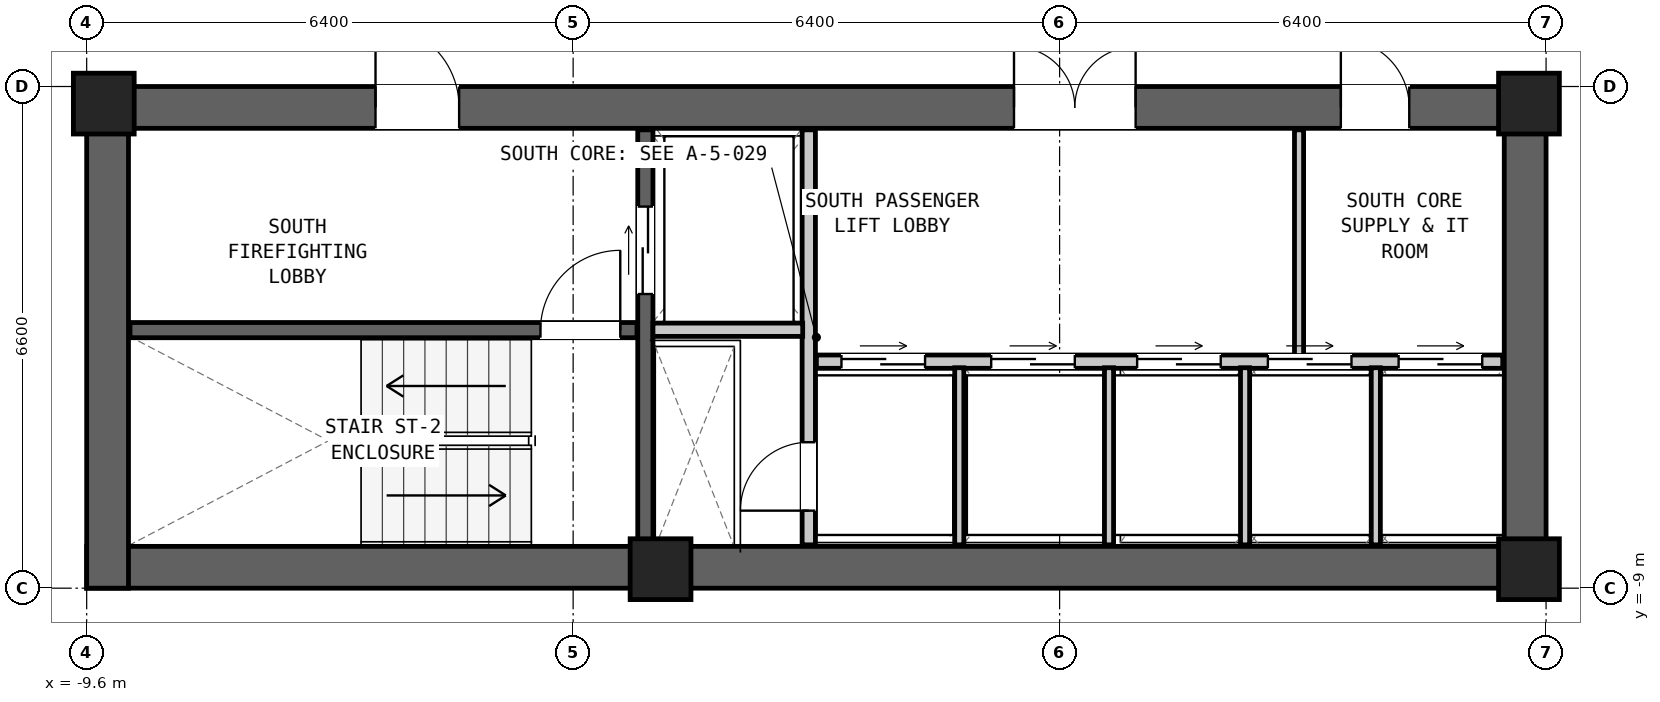
"""IFC4 building model, lengths in metres.
Left out: names, types, materials, properties, quantities, classifications, styles, units other than length and angle.
Written with IfcOpenShell. Run it as: python <this file> out.ifc"""

import sys

from ifc_helpers import new_model, si_unit, direction, frame, frame_2d, origin, origin_2d, place, context, subcontext, project, spatial, rectangle, extrude, element, fill, save


model = new_model("IFC4")
c1 = context("Model", 3, precision=1e-05, world=origin(), true_north=direction((0.0, 1.0)))
c2 = subcontext(c1, "Body", "Model", "MODEL_VIEW")
j1 = project(units=[si_unit("LENGTHUNIT", "METRE"), si_unit("PLANEANGLEUNIT", "RADIAN")], contexts=[c1])
p1 = place(None, origin())
s1 = spatial("IfcSite", under=j1, at=p1, CompositionType="ELEMENT")
p2 = place(p1, origin())
s2 = spatial("IfcBuilding", under=s1, at=p2, CompositionType="ELEMENT")
p3 = place(p2, frame((0.0, 0.0, 90.8)))
s3 = spatial("IfcBuildingStorey", under=s2, at=p3, CompositionType="ELEMENT", Elevation=90.8)
p4 = place(p3, frame((-9.6, -8.725, 0.0), z_axis=(0.0, 0.0, 1.0), x_axis=(1.0, 0.0, 0.0)))
e1 = element("IfcWall", 1, at=p4, inside=s3, PredefinedType="SHEAR", context=c2, shape_type="SweptSolid", body=[
    extrude(rectangle(XDim=19.2, YDim=0.55, at=frame_2d((9.6, 0.0))), origin(), (0.0, 0.0, 1.0), 3.05),
])
p5 = place(p3, frame((-9.6, -2.675, 0.0), z_axis=(0.0, 0.0, 1.0), x_axis=(1.0, 0.0, 0.0)))
e2 = element("IfcWall", 2, at=p5, inside=s3, PredefinedType="SHEAR", context=c2, shape_type="SweptSolid", body=[
    extrude(rectangle(XDim=19.2, YDim=0.55, at=frame_2d((9.6, 0.0))), origin(), (0.0, 0.0, 1.0), 3.05),
])
p6 = place(p5, frame((3.8, 0.0, 0.0)))
e3 = element("IfcOpeningElement", 3, at=p6, cuts=e2, PredefinedType="OPENING", context=c2, shape_type="SweptSolid", body=[
    extrude(rectangle(XDim=1.1, YDim=2.08, at=frame_2d((0.55, 1.04))), frame((0.0, 0.287, 0.0), z_axis=(0.0, -1.0, 0.0), x_axis=(1.0, 0.0, 0.0)), (0.0, 0.0, 1.0), 0.574),
])
p7 = place(p5, frame((12.2, 0.0, 0.0)))
e4 = element("IfcOpeningElement", 4, at=p7, cuts=e2, PredefinedType="OPENING", context=c2, shape_type="SweptSolid", body=[
    extrude(rectangle(XDim=1.6, YDim=2.12, at=frame_2d((0.8, 1.06))), frame((0.0, 0.287, 0.0), z_axis=(0.0, -1.0, 0.0), x_axis=(1.0, 0.0, 0.0)), (0.0, 0.0, 1.0), 0.574),
])
p8 = place(p5, frame((16.5, 0.0, 0.0)))
e5 = element("IfcOpeningElement", 5, at=p8, cuts=e2, PredefinedType="OPENING", context=c2, shape_type="SweptSolid", body=[
    extrude(rectangle(XDim=0.9, YDim=2.05, at=frame_2d((0.45, 1.025))), frame((0.0, 0.287, 0.0), z_axis=(0.0, -1.0, 0.0), x_axis=(1.0, 0.0, 0.0)), (0.0, 0.0, 1.0), 0.574),
])
for number, where, z_axis, x_axis in (
    (6, (-9.325, -9.0, 0.0), (0.0, 0.0, 1.0), (0.0, 1.0, 0.0)),
    (7, (9.325, -9.0, 0.0), (0.0, 0.0, 1.0), (0.0, 1.0, 0.0)),
):
    element("IfcWall", number, at=place(p3, frame(where, z_axis=z_axis, x_axis=x_axis)), inside=s3, PredefinedType="SHEAR", context=c2, shape_type="SweptSolid", body=[
        extrude(rectangle(XDim=6.6, YDim=0.55, at=frame_2d((3.3, 0.0))), origin(), (0.0, 0.0, 1.0), 3.05),
    ])
for number, where, z_axis, x_axis in (
    (8, (-9.375, -2.625, 0.0), (0.0, 0.0, 1.0), (1.0, 0.0, 0.0)),
    (9, (9.375, -2.625, 0.0), (0.0, 0.0, 1.0), (1.0, 0.0, 0.0)),
    (10, (-2.05, -8.75, 0.0), (0.0, 0.0, 1.0), (1.0, 0.0, 0.0)),
    (11, (9.375, -8.75, 0.0), (0.0, 0.0, 1.0), (1.0, 0.0, 0.0)),
):
    element("IfcColumn", number, at=place(p3, frame(where, z_axis=z_axis, x_axis=x_axis)), inside=s3, PredefinedType="COLUMN", context=c2, shape_type="SweptSolid", body=[
        extrude(rectangle(XDim=0.8, YDim=0.8, at=origin_2d()), origin(), (0.0, 0.0, 1.0), 3.05),
    ])
p9 = place(p3, frame((-9.03, -5.605, 0.0), z_axis=(0.0, 0.0, 1.0), x_axis=(1.0, 0.0, 0.0)))
e12 = element("IfcWall", 12, at=p9, inside=s3, PredefinedType="SHEAR", context=c2, shape_type="SweptSolid", body=[
    extrude(rectangle(XDim=6.67, YDim=0.2, at=frame_2d((3.335, 0.0))), origin(), (0.0, 0.0, 1.0), 2.83),
])
p10 = place(p9, frame((5.4, 0.0, 0.0)))
e13 = element("IfcOpeningElement", 13, at=p10, cuts=e12, PredefinedType="OPENING", context=c2, shape_type="SweptSolid", body=[
    extrude(rectangle(XDim=1.05, YDim=2.08, at=frame_2d((0.525, 1.04))), frame((0.0, 0.112, 0.0), z_axis=(0.0, -1.0, 0.0), x_axis=(1.0, 0.0, 0.0)), (0.0, 0.0, 1.0), 0.224),
])
p11 = place(p3, frame((-2.25, -8.43, 0.0), z_axis=(0.0, 0.0, 1.0), x_axis=(0.0, 1.0, 0.0)))
e14 = element("IfcWall", 14, at=p11, inside=s3, PredefinedType="SHEAR", context=c2, shape_type="SweptSolid", body=[
    extrude(rectangle(XDim=5.46, YDim=0.2, at=frame_2d((2.73, 0.0))), origin(), (0.0, 0.0, 1.0), 2.83),
])
p12 = place(p11, frame((3.3, 0.0, 0.0)))
e15 = element("IfcOpeningElement", 15, at=p12, cuts=e14, PredefinedType="OPENING", context=c2, shape_type="SweptSolid", body=[
    extrude(rectangle(XDim=1.15, YDim=2.08, at=frame_2d((0.575, 1.04))), frame((0.0, 0.112, 0.0), z_axis=(0.0, -1.0, 0.0), x_axis=(1.0, 0.0, 0.0)), (0.0, 0.0, 1.0), 0.224),
])
p13 = place(p3, frame((-0.1, -8.43, 0.0), z_axis=(0.0, 0.0, 1.0), x_axis=(0.0, 1.0, 0.0)))
e16 = element("IfcWall", 16, at=p13, inside=s3, PredefinedType="PARTITIONING", context=c2, shape_type="SweptSolid", body=[
    extrude(rectangle(XDim=5.46, YDim=0.175, at=frame_2d((2.73, 0.0))), origin(), (0.0, 0.0, 1.0), 2.83),
])
p14 = place(p13, frame((0.45, 0.0, 0.0)))
e17 = element("IfcOpeningElement", 17, at=p14, cuts=e16, PredefinedType="OPENING", context=c2, shape_type="SweptSolid", body=[
    extrude(rectangle(XDim=0.9, YDim=2.05, at=frame_2d((0.45, 1.025))), frame((0.0, 0.1, 0.0), z_axis=(0.0, -1.0, 0.0), x_axis=(1.0, 0.0, 0.0)), (0.0, 0.0, 1.0), 0.199),
])
p15 = place(p3, frame((-2.15, -5.6, 0.0), z_axis=(0.0, 0.0, 1.0), x_axis=(1.0, 0.0, 0.0)))
e18 = element("IfcWall", 18, at=p15, inside=s3, PredefinedType="PARTITIONING", context=c2, shape_type="SweptSolid", body=[
    extrude(rectangle(XDim=1.97, YDim=0.175, at=frame_2d((0.985, 0.0))), origin(), (0.0, 0.0, 1.0), 2.83),
])
p16 = place(p3, frame((0.0, -6.02, 0.0), z_axis=(0.0, 0.0, 1.0), x_axis=(1.0, 0.0, 0.0)))
e19 = element("IfcWall", 19, at=p16, inside=s3, PredefinedType="PARTITIONING", context=c2, shape_type="SweptSolid", body=[
    extrude(rectangle(XDim=9.03, YDim=0.175, at=frame_2d((4.515, 0.0))), origin(), (0.0, 0.0, 1.0), 2.83),
])
p17 = place(p16, frame((0.33, 0.0, 0.0)))
e20 = element("IfcOpeningElement", 20, at=p17, cuts=e19, PredefinedType="OPENING", context=c2, shape_type="SweptSolid", body=[
    extrude(rectangle(XDim=1.1, YDim=2.06, at=frame_2d((0.55, 1.03))), frame((0.0, 0.1, 0.0), z_axis=(0.0, -1.0, 0.0), x_axis=(1.0, 0.0, 0.0)), (0.0, 0.0, 1.0), 0.199),
])
p18 = place(p16, frame((2.3, 0.0, 0.0)))
e21 = element("IfcOpeningElement", 21, at=p18, cuts=e19, PredefinedType="OPENING", context=c2, shape_type="SweptSolid", body=[
    extrude(rectangle(XDim=1.1, YDim=2.06, at=frame_2d((0.55, 1.03))), frame((0.0, 0.1, 0.0), z_axis=(0.0, -1.0, 0.0), x_axis=(1.0, 0.0, 0.0)), (0.0, 0.0, 1.0), 0.199),
])
p19 = place(p16, frame((4.22, 0.0, 0.0)))
e22 = element("IfcOpeningElement", 22, at=p19, cuts=e19, PredefinedType="OPENING", context=c2, shape_type="SweptSolid", body=[
    extrude(rectangle(XDim=1.1, YDim=2.06, at=frame_2d((0.55, 1.03))), frame((0.0, 0.1, 0.0), z_axis=(0.0, -1.0, 0.0), x_axis=(1.0, 0.0, 0.0)), (0.0, 0.0, 1.0), 0.199),
])
p20 = place(p16, frame((5.94, 0.0, 0.0)))
e23 = element("IfcOpeningElement", 23, at=p20, cuts=e19, PredefinedType="OPENING", context=c2, shape_type="SweptSolid", body=[
    extrude(rectangle(XDim=1.1, YDim=2.06, at=frame_2d((0.55, 1.03))), frame((0.0, 0.1, 0.0), z_axis=(0.0, -1.0, 0.0), x_axis=(1.0, 0.0, 0.0)), (0.0, 0.0, 1.0), 0.199),
])
p21 = place(p16, frame((7.66, 0.0, 0.0)))
e24 = element("IfcOpeningElement", 24, at=p21, cuts=e19, PredefinedType="OPENING", context=c2, shape_type="SweptSolid", body=[
    extrude(rectangle(XDim=1.1, YDim=2.06, at=frame_2d((0.55, 1.03))), frame((0.0, 0.1, 0.0), z_axis=(0.0, -1.0, 0.0), x_axis=(1.0, 0.0, 0.0)), (0.0, 0.0, 1.0), 0.199),
])
for number, where, z_axis, x_axis in (
    (25, (1.88, -8.43, 0.0), (0.0, 0.0, 1.0), (0.0, 1.0, 0.0)),
    (26, (3.85, -8.43, 0.0), (0.0, 0.0, 1.0), (0.0, 1.0, 0.0)),
    (27, (5.64, -8.43, 0.0), (0.0, 0.0, 1.0), (0.0, 1.0, 0.0)),
    (28, (7.36, -8.43, 0.0), (0.0, 0.0, 1.0), (0.0, 1.0, 0.0)),
):
    element("IfcWall", number, at=place(p3, frame(where, z_axis=z_axis, x_axis=x_axis)), inside=s3, PredefinedType="PARTITIONING", context=c2, shape_type="SweptSolid", body=[
        extrude(rectangle(XDim=2.33, YDim=0.12, at=frame_2d((1.165, 0.0))), origin(), (0.0, 0.0, 1.0), 2.83),
    ])
p22 = place(p3, frame((6.35, -5.94, 0.0), z_axis=(0.0, 0.0, 1.0), x_axis=(0.0, 1.0, 0.0)))
e29 = element("IfcWall", 29, at=p22, inside=s3, PredefinedType="PARTITIONING", context=c2, shape_type="SweptSolid", body=[
    extrude(rectangle(XDim=2.97, YDim=0.12, at=frame_2d((1.485, 0.0))), origin(), (0.0, 0.0, 1.0), 2.83),
])
p23 = place(p10, origin())
e30 = element("IfcDoor", 30, at=p23, inside=s3, OperationType="SINGLE_SWING_RIGHT", PredefinedType="DOOR", context=c2, shape_type="SweptSolid", body=[
    extrude(rectangle(XDim=1.05, YDim=2.08, at=frame_2d((0.525, 1.04))), frame((0.0, 0.025, 0.0), z_axis=(0.0, -1.0, 0.0), x_axis=(1.0, 0.0, 0.0)), (0.0, 0.0, 1.0), 0.05),
])
fill(e13, e30)
p24 = place(p6, origin())
e31 = element("IfcDoor", 31, at=p24, inside=s3, OperationType="SINGLE_SWING_LEFT", PredefinedType="DOOR", context=c2, shape_type="SweptSolid", body=[
    extrude(rectangle(XDim=1.1, YDim=2.08, at=frame_2d((0.55, 1.04))), frame((0.0, 0.025, 0.0), z_axis=(0.0, -1.0, 0.0), x_axis=(1.0, 0.0, 0.0)), (0.0, 0.0, 1.0), 0.05),
])
fill(e3, e31)
p25 = place(p12, origin())
e32 = element("IfcDoor", 32, at=p25, inside=s3, OperationType="DOUBLE_DOOR_SLIDING", PredefinedType="DOOR", context=c2, shape_type="SweptSolid", body=[
    extrude(rectangle(XDim=1.15, YDim=2.08, at=frame_2d((0.575, 1.04))), frame((0.0, 0.025, 0.0), z_axis=(0.0, -1.0, 0.0), x_axis=(1.0, 0.0, 0.0)), (0.0, 0.0, 1.0), 0.05),
])
fill(e15, e32)
p26 = place(p14, origin())
e33 = element("IfcDoor", 33, at=p26, inside=s3, OperationType="SINGLE_SWING_LEFT", PredefinedType="DOOR", context=c2, shape_type="SweptSolid", body=[
    extrude(rectangle(XDim=0.9, YDim=2.05, at=frame_2d((0.45, 1.025))), frame((0.0, 0.025, 0.0), z_axis=(0.0, -1.0, 0.0), x_axis=(1.0, 0.0, 0.0)), (0.0, 0.0, 1.0), 0.05),
])
fill(e17, e33)
p27 = place(p7, origin())
e34 = element("IfcDoor", 34, at=p27, inside=s3, OperationType="DOUBLE_DOOR_SINGLE_SWING", PredefinedType="DOOR", context=c2, shape_type="SweptSolid", body=[
    extrude(rectangle(XDim=1.6, YDim=2.12, at=frame_2d((0.8, 1.06))), frame((0.0, 0.025, 0.0), z_axis=(0.0, -1.0, 0.0), x_axis=(1.0, 0.0, 0.0)), (0.0, 0.0, 1.0), 0.05),
])
fill(e4, e34)
p28 = place(p8, origin())
e35 = element("IfcDoor", 35, at=p28, inside=s3, OperationType="SINGLE_SWING_LEFT", PredefinedType="DOOR", context=c2, shape_type="SweptSolid", body=[
    extrude(rectangle(XDim=0.9, YDim=2.05, at=frame_2d((0.45, 1.025))), frame((0.0, 0.025, 0.0), z_axis=(0.0, -1.0, 0.0), x_axis=(1.0, 0.0, 0.0)), (0.0, 0.0, 1.0), 0.05),
])
fill(e5, e35)
p29 = place(p17, origin())
e36 = element("IfcDoor", 36, at=p29, inside=s3, OperationType="DOUBLE_DOOR_SLIDING", PredefinedType="DOOR", context=c2, shape_type="SweptSolid", body=[
    extrude(rectangle(XDim=1.1, YDim=2.06, at=frame_2d((0.55, 1.03))), frame((0.0, 0.025, 0.0), z_axis=(0.0, -1.0, 0.0), x_axis=(1.0, 0.0, 0.0)), (0.0, 0.0, 1.0), 0.05),
])
fill(e20, e36)
p30 = place(p18, origin())
e37 = element("IfcDoor", 37, at=p30, inside=s3, OperationType="DOUBLE_DOOR_SLIDING", PredefinedType="DOOR", context=c2, shape_type="SweptSolid", body=[
    extrude(rectangle(XDim=1.1, YDim=2.06, at=frame_2d((0.55, 1.03))), frame((0.0, 0.025, 0.0), z_axis=(0.0, -1.0, 0.0), x_axis=(1.0, 0.0, 0.0)), (0.0, 0.0, 1.0), 0.05),
])
fill(e21, e37)
p31 = place(p19, origin())
e38 = element("IfcDoor", 38, at=p31, inside=s3, OperationType="DOUBLE_DOOR_SLIDING", PredefinedType="DOOR", context=c2, shape_type="SweptSolid", body=[
    extrude(rectangle(XDim=1.1, YDim=2.06, at=frame_2d((0.55, 1.03))), frame((0.0, 0.025, 0.0), z_axis=(0.0, -1.0, 0.0), x_axis=(1.0, 0.0, 0.0)), (0.0, 0.0, 1.0), 0.05),
])
fill(e22, e38)
p32 = place(p20, origin())
e39 = element("IfcDoor", 39, at=p32, inside=s3, OperationType="DOUBLE_DOOR_SLIDING", PredefinedType="DOOR", context=c2, shape_type="SweptSolid", body=[
    extrude(rectangle(XDim=1.1, YDim=2.06, at=frame_2d((0.55, 1.03))), frame((0.0, 0.025, 0.0), z_axis=(0.0, -1.0, 0.0), x_axis=(1.0, 0.0, 0.0)), (0.0, 0.0, 1.0), 0.05),
])
fill(e23, e39)
p33 = place(p21, origin())
e40 = element("IfcDoor", 40, at=p33, inside=s3, OperationType="DOUBLE_DOOR_SLIDING", PredefinedType="DOOR", context=c2, shape_type="SweptSolid", body=[
    extrude(rectangle(XDim=1.1, YDim=2.06, at=frame_2d((0.55, 1.03))), frame((0.0, 0.025, 0.0), z_axis=(0.0, -1.0, 0.0), x_axis=(1.0, 0.0, 0.0)), (0.0, 0.0, 1.0), 0.05),
])
fill(e24, e40)
save(model, sys.argv[1])
